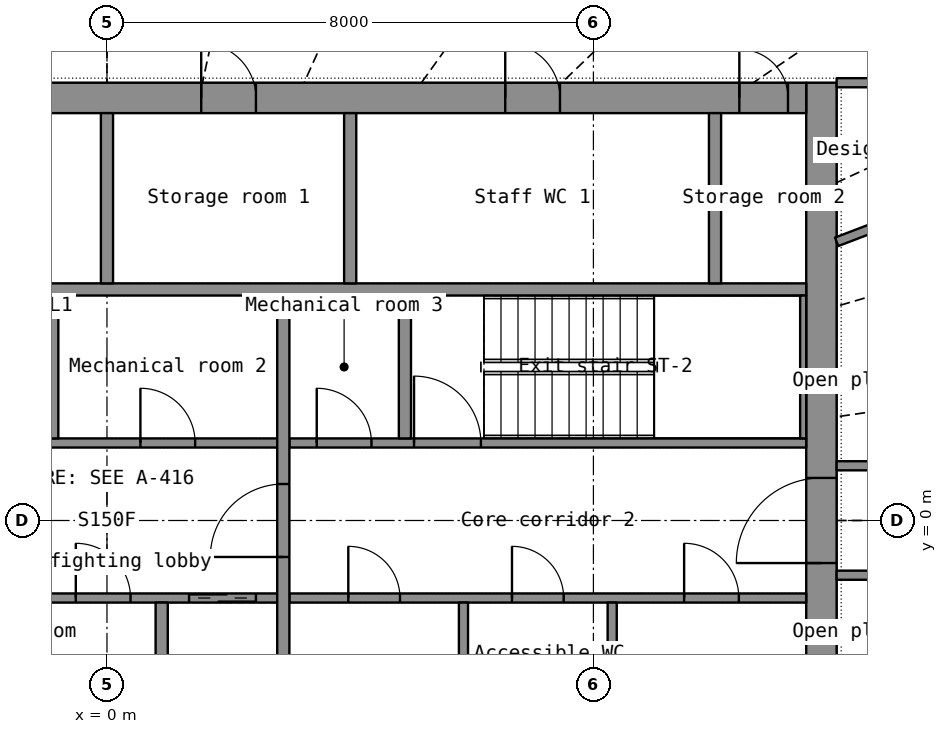
"""IFC4 building model, lengths in metres.
Left out: names, types, materials, properties, quantities, classifications, styles, units other than length and angle.
Written with IfcOpenShell. Run it as: python <this file> out.ifc"""

import sys

from ifc_helpers import new_model, si_unit, direction, frame, frame_2d, origin, place, context, subcontext, project, spatial, rectangle, extrude, element, fill, save


model = new_model("IFC4")
c1 = context("Model", 3, precision=1e-05, world=origin(), true_north=direction((0.0, 1.0)))
c2 = subcontext(c1, "Body", "Model", "MODEL_VIEW")
j1 = project(units=[si_unit("LENGTHUNIT", "METRE"), si_unit("PLANEANGLEUNIT", "RADIAN")], contexts=[c1])
p1 = place(None, origin())
s1 = spatial("IfcSite", under=j1, at=p1, CompositionType="ELEMENT")
p2 = place(p1, origin())
s2 = spatial("IfcBuilding", under=s1, at=p2, CompositionType="ELEMENT")
p3 = place(p2, frame((0.0, 0.0, 111.9)))
s3 = spatial("IfcBuildingStorey", under=s2, at=p3, CompositionType="ELEMENT", Elevation=111.9)
p4 = place(p3, frame((11.75, -7.2, 0.0), z_axis=(0.0, 0.0, 1.0), x_axis=(0.0, 1.0, 0.0)))
e1 = element("IfcWall", 1, at=p4, inside=s3, PredefinedType="SHEAR", context=c2, shape_type="SweptSolid", body=[
    extrude(rectangle(XDim=14.4, YDim=0.5, at=frame_2d((7.2, 0.0))), origin(), (0.0, 0.0, 1.0), 3.3),
])
p5 = place(p4, frame((6.5, 0.0, 0.0)))
e2 = element("IfcOpeningElement", 2, at=p5, cuts=e1, PredefinedType="OPENING", context=c2, shape_type="SweptSolid", body=[
    extrude(rectangle(XDim=1.4, YDim=2.2, at=frame_2d((0.7, 1.1))), frame((0.0, 0.26, 0.0), z_axis=(0.0, -1.0, 0.0), x_axis=(1.0, 0.0, 0.0)), (0.0, 0.0, 1.0), 0.52),
])
p6 = place(p3, frame((-11.5, 6.95, 0.0), z_axis=(0.0, 0.0, 1.0), x_axis=(1.0, 0.0, 0.0)))
e3 = element("IfcWall", 3, at=p6, inside=s3, PredefinedType="SHEAR", context=c2, shape_type="SweptSolid", body=[
    extrude(rectangle(XDim=23.0, YDim=0.5, at=frame_2d((11.5, 0.0))), origin(), (0.0, 0.0, 1.0), 3.3),
])
p7 = place(p6, frame((1.95, 0.0, 0.0)))
e4 = element("IfcOpeningElement", 4, at=p7, cuts=e3, PredefinedType="OPENING", context=c2, shape_type="SweptSolid", body=[
    extrude(rectangle(XDim=1.1, YDim=2.2, at=frame_2d((0.55, 1.1))), frame((0.0, 0.26, 0.0), z_axis=(0.0, -1.0, 0.0), x_axis=(1.0, 0.0, 0.0)), (0.0, 0.0, 1.0), 0.52),
])
p8 = place(p6, frame((8.05, 0.0, 0.0)))
e5 = element("IfcOpeningElement", 5, at=p8, cuts=e3, PredefinedType="OPENING", context=c2, shape_type="SweptSolid", body=[
    extrude(rectangle(XDim=0.9, YDim=2.1, at=frame_2d((0.45, 1.05))), frame((0.0, 0.26, 0.0), z_axis=(0.0, -1.0, 0.0), x_axis=(1.0, 0.0, 0.0)), (0.0, 0.0, 1.0), 0.52),
])
p9 = place(p6, frame((13.05, 0.0, 0.0)))
e6 = element("IfcOpeningElement", 6, at=p9, cuts=e3, PredefinedType="OPENING", context=c2, shape_type="SweptSolid", body=[
    extrude(rectangle(XDim=0.9, YDim=2.1, at=frame_2d((0.45, 1.05))), frame((0.0, 0.26, 0.0), z_axis=(0.0, -1.0, 0.0), x_axis=(1.0, 0.0, 0.0)), (0.0, 0.0, 1.0), 0.52),
])
p10 = place(p6, frame((18.05, 0.0, 0.0)))
e7 = element("IfcOpeningElement", 7, at=p10, cuts=e3, PredefinedType="OPENING", context=c2, shape_type="SweptSolid", body=[
    extrude(rectangle(XDim=0.9, YDim=2.1, at=frame_2d((0.45, 1.05))), frame((0.0, 0.26, 0.0), z_axis=(0.0, -1.0, 0.0), x_axis=(1.0, 0.0, 0.0)), (0.0, 0.0, 1.0), 0.52),
])
p11 = place(p6, frame((0.3, 0.0, 0.0)))
e8 = element("IfcOpeningElement", 8, at=p11, cuts=e3, PredefinedType="OPENING", context=c2, shape_type="SweptSolid", body=[
    extrude(rectangle(XDim=0.8, YDim=2.05, at=frame_2d((0.4, 1.025))), frame((0.0, 0.26, 0.0), z_axis=(0.0, -1.0, 0.0), x_axis=(1.0, 0.0, 0.0)), (0.0, 0.0, 1.0), 0.52),
])
p12 = place(p6, frame((21.9, 0.0, 0.0)))
e9 = element("IfcOpeningElement", 9, at=p12, cuts=e3, PredefinedType="OPENING", context=c2, shape_type="SweptSolid", body=[
    extrude(rectangle(XDim=0.8, YDim=2.05, at=frame_2d((0.4, 1.025))), frame((0.0, 0.26, 0.0), z_axis=(0.0, -1.0, 0.0), x_axis=(1.0, 0.0, 0.0)), (0.0, 0.0, 1.0), 0.52),
])
p13 = place(p3, frame((-11.5, 3.8, 0.0), z_axis=(0.0, 0.0, 1.0), x_axis=(1.0, 0.0, 0.0)))
e10 = element("IfcWall", 10, at=p13, inside=s3, PredefinedType="SHEAR", context=c2, shape_type="SweptSolid", body=[
    extrude(rectangle(XDim=23.0, YDim=0.2, at=frame_2d((11.5, 0.0))), origin(), (0.0, 0.0, 1.0), 3.3),
])
p14 = place(p3, frame((10.0, 3.9, 0.0), z_axis=(0.0, 0.0, 1.0), x_axis=(0.0, 1.0, 0.0)))
e11 = element("IfcWall", 11, at=p14, inside=s3, PredefinedType="SHEAR", context=c2, shape_type="SweptSolid", body=[
    extrude(rectangle(XDim=2.8, YDim=0.2, at=frame_2d((1.4, 0.0))), origin(), (0.0, 0.0, 1.0), 3.3),
])
for number, where, z_axis, x_axis in (
    (12, (0.0, 3.9, 0.0), (0.0, 0.0, 1.0), (0.0, 1.0, 0.0)),
    (13, (4.0, 3.9, 0.0), (0.0, 0.0, 1.0), (0.0, 1.0, 0.0)),
):
    element("IfcWall", number, at=place(p3, frame(where, z_axis=z_axis, x_axis=x_axis)), inside=s3, PredefinedType="PARTITIONING", context=c2, shape_type="SweptSolid", body=[
        extrude(rectangle(XDim=2.8, YDim=0.2, at=frame_2d((1.4, 0.0))), origin(), (0.0, 0.0, 1.0), 3.3),
    ])
p15 = place(p3, frame((-2.8, -1.275, 0.0), z_axis=(0.0, 0.0, 1.0), x_axis=(1.0, 0.0, 0.0)))
e14 = element("IfcWall", 14, at=p15, inside=s3, PredefinedType="SHEAR", context=c2, shape_type="SweptSolid", body=[
    extrude(rectangle(XDim=5.6, YDim=0.15, at=frame_2d((2.8, 0.0))), origin(), (0.0, 0.0, 1.0), 3.3),
])
p16 = place(p15, frame((4.15, 0.0, 0.0)))
e15 = element("IfcOpeningElement", 15, at=p16, cuts=e14, PredefinedType="OPENING", context=c2, shape_type="SweptSolid", body=[
    extrude(rectangle(XDim=1.1, YDim=2.2, at=frame_2d((0.55, 1.1))), frame((0.0, 0.085, 0.0), z_axis=(0.0, -1.0, 0.0), x_axis=(1.0, 0.0, 0.0)), (0.0, 0.0, 1.0), 0.17),
])
p17 = place(p15, frame((0.413, 0.0, 0.0)))
e16 = element("IfcOpeningElement", 16, at=p17, cuts=e14, PredefinedType="OPENING", context=c2, shape_type="SweptSolid", body=[
    extrude(rectangle(XDim=0.9, YDim=2.1, at=frame_2d((0.45, 1.05))), frame((0.0, 0.085, 0.0), z_axis=(0.0, -1.0, 0.0), x_axis=(1.0, 0.0, 0.0)), (0.0, 0.0, 1.0), 0.17),
])
p18 = place(p15, frame((2.288, 0.0, 0.0)))
e17 = element("IfcOpeningElement", 17, at=p18, cuts=e14, PredefinedType="OPENING", context=c2, shape_type="SweptSolid", body=[
    extrude(rectangle(XDim=0.9, YDim=2.1, at=frame_2d((0.45, 1.05))), frame((0.0, 0.085, 0.0), z_axis=(0.0, -1.0, 0.0), x_axis=(1.0, 0.0, 0.0)), (0.0, 0.0, 1.0), 0.17),
])
p19 = place(p3, frame((3.0, -1.275, 0.0), z_axis=(0.0, 0.0, 1.0), x_axis=(1.0, 0.0, 0.0)))
e18 = element("IfcWall", 18, at=p19, inside=s3, PredefinedType="PARTITIONING", context=c2, shape_type="SweptSolid", body=[
    extrude(rectangle(XDim=8.5, YDim=0.15, at=frame_2d((4.25, 0.0))), origin(), (0.0, 0.0, 1.0), 3.3),
])
p20 = place(p19, frame((0.969, 0.0, 0.0)))
e19 = element("IfcOpeningElement", 19, at=p20, cuts=e18, PredefinedType="OPENING", context=c2, shape_type="SweptSolid", body=[
    extrude(rectangle(XDim=0.85, YDim=2.1, at=frame_2d((0.425, 1.05))), frame((0.0, 0.085, 0.0), z_axis=(0.0, -1.0, 0.0), x_axis=(1.0, 0.0, 0.0)), (0.0, 0.0, 1.0), 0.17),
])
p21 = place(p19, frame((3.661, 0.0, 0.0)))
e20 = element("IfcOpeningElement", 20, at=p21, cuts=e18, PredefinedType="OPENING", context=c2, shape_type="SweptSolid", body=[
    extrude(rectangle(XDim=0.85, YDim=2.1, at=frame_2d((0.425, 1.05))), frame((0.0, 0.085, 0.0), z_axis=(0.0, -1.0, 0.0), x_axis=(1.0, 0.0, 0.0)), (0.0, 0.0, 1.0), 0.17),
])
p22 = place(p19, frame((6.492, 0.0, 0.0)))
e21 = element("IfcOpeningElement", 21, at=p22, cuts=e18, PredefinedType="OPENING", context=c2, shape_type="SweptSolid", body=[
    extrude(rectangle(XDim=0.9, YDim=2.1, at=frame_2d((0.45, 1.05))), frame((0.0, 0.085, 0.0), z_axis=(0.0, -1.0, 0.0), x_axis=(1.0, 0.0, 0.0)), (0.0, 0.0, 1.0), 0.17),
])
p23 = place(p3, frame((-2.8, 1.275, 0.0), z_axis=(0.0, 0.0, 1.0), x_axis=(1.0, 0.0, 0.0)))
e22 = element("IfcWall", 22, at=p23, inside=s3, PredefinedType="SHEAR", context=c2, shape_type="SweptSolid", body=[
    extrude(rectangle(XDim=5.6, YDim=0.15, at=frame_2d((2.8, 0.0))), origin(), (0.0, 0.0, 1.0), 3.3),
])
p24 = place(p23, frame((0.35, 0.0, 0.0)))
e23 = element("IfcOpeningElement", 23, at=p24, cuts=e22, PredefinedType="OPENING", context=c2, shape_type="SweptSolid", body=[
    extrude(rectangle(XDim=1.1, YDim=2.2, at=frame_2d((0.55, 1.1))), frame((0.0, 0.085, 0.0), z_axis=(0.0, -1.0, 0.0), x_axis=(1.0, 0.0, 0.0)), (0.0, 0.0, 1.0), 0.17),
])
p25 = place(p23, frame((3.35, 0.0, 0.0)))
e24 = element("IfcOpeningElement", 24, at=p25, cuts=e22, PredefinedType="OPENING", context=c2, shape_type="SweptSolid", body=[
    extrude(rectangle(XDim=0.9, YDim=2.1, at=frame_2d((0.45, 1.05))), frame((0.0, 0.085, 0.0), z_axis=(0.0, -1.0, 0.0), x_axis=(1.0, 0.0, 0.0)), (0.0, 0.0, 1.0), 0.17),
])
p26 = place(p3, frame((3.0, 1.275, 0.0), z_axis=(0.0, 0.0, 1.0), x_axis=(1.0, 0.0, 0.0)))
e25 = element("IfcWall", 25, at=p26, inside=s3, PredefinedType="SHEAR", context=c2, shape_type="SweptSolid", body=[
    extrude(rectangle(XDim=8.5, YDim=0.15, at=frame_2d((4.25, 0.0))), origin(), (0.0, 0.0, 1.0), 3.3),
])
p27 = place(p26, frame((2.05, 0.0, 0.0)))
e26 = element("IfcOpeningElement", 26, at=p27, cuts=e25, PredefinedType="OPENING", context=c2, shape_type="SweptSolid", body=[
    extrude(rectangle(XDim=1.1, YDim=2.15, at=frame_2d((0.55, 1.075))), frame((0.0, 0.085, 0.0), z_axis=(0.0, -1.0, 0.0), x_axis=(1.0, 0.0, 0.0)), (0.0, 0.0, 1.0), 0.17),
])
p28 = place(p26, frame((0.45, 0.0, 0.0)))
e27 = element("IfcOpeningElement", 27, at=p28, cuts=e25, PredefinedType="OPENING", context=c2, shape_type="SweptSolid", body=[
    extrude(rectangle(XDim=0.9, YDim=2.1, at=frame_2d((0.45, 1.05))), frame((0.0, 0.085, 0.0), z_axis=(0.0, -1.0, 0.0), x_axis=(1.0, 0.0, 0.0)), (0.0, 0.0, 1.0), 0.17),
])
p29 = place(p3, frame((2.9, -3.7, 0.0), z_axis=(0.0, 0.0, 1.0), x_axis=(0.0, 1.0, 0.0)))
e28 = element("IfcWall", 28, at=p29, inside=s3, PredefinedType="SHEAR", context=c2, shape_type="SweptSolid", body=[
    extrude(rectangle(XDim=7.4, YDim=0.2, at=frame_2d((3.7, 0.0))), origin(), (0.0, 0.0, 1.0), 3.3),
])
p30 = place(p29, frame((3.1, 0.0, 0.0)))
e29 = element("IfcOpeningElement", 29, at=p30, cuts=e28, PredefinedType="OPENING", context=c2, shape_type="SweptSolid", body=[
    extrude(rectangle(XDim=1.2, YDim=2.2, at=frame_2d((0.6, 1.1))), frame((0.0, 0.11, 0.0), z_axis=(0.0, -1.0, 0.0), x_axis=(1.0, 0.0, 0.0)), (0.0, 0.0, 1.0), 0.22),
])
for number, where, z_axis, x_axis in (
    (30, (-0.9, 1.35, 0.0), (0.0, 0.0, 1.0), (0.0, 1.0, 0.0)),
    (31, (0.9, -3.7, 0.0), (0.0, 0.0, 1.0), (0.0, 1.0, 0.0)),
):
    element("IfcWall", number, at=place(p3, frame(where, z_axis=z_axis, x_axis=x_axis)), inside=s3, PredefinedType="SHEAR", context=c2, shape_type="SweptSolid", body=[
        extrude(rectangle(XDim=2.35, YDim=0.2, at=frame_2d((1.175, 0.0))), origin(), (0.0, 0.0, 1.0), 3.3),
    ])
p31 = place(p3, frame((11.45, 1.35, 0.0), z_axis=(0.0, 0.0, 1.0), x_axis=(0.0, 1.0, 0.0)))
e32 = element("IfcWall", 32, at=p31, inside=s3, PredefinedType="SHEAR", context=c2, shape_type="SweptSolid", body=[
    extrude(rectangle(XDim=2.35, YDim=0.1, at=frame_2d((1.175, 0.0))), origin(), (0.0, 0.0, 1.0), 3.3),
])
p32 = place(p3, frame((4.9, 1.35, 0.0), z_axis=(0.0, 0.0, 1.0), x_axis=(0.0, 1.0, 0.0)))
e33 = element("IfcWall", 33, at=p32, inside=s3, PredefinedType="SHEAR", context=c2, shape_type="SweptSolid", body=[
    extrude(rectangle(XDim=2.35, YDim=0.2, at=frame_2d((1.175, 0.0))), origin(), (0.0, 0.0, 1.0), 3.3),
])
for number, where, z_axis, x_axis in (
    (34, (5.863, -3.7, 0.0), (0.0, 0.0, 1.0), (0.0, 1.0, 0.0)),
    (35, (8.309, -3.7, 0.0), (0.0, 0.0, 1.0), (0.0, 1.0, 0.0)),
):
    element("IfcWall", number, at=place(p3, frame(where, z_axis=z_axis, x_axis=x_axis)), inside=s3, PredefinedType="PARTITIONING", context=c2, shape_type="SweptSolid", body=[
        extrude(rectangle(XDim=2.35, YDim=0.15, at=frame_2d((1.175, 0.0))), origin(), (0.0, 0.0, 1.0), 3.3),
    ])
p33 = place(p3, frame((15.896, 6.072, 0.0), z_axis=(0.0, 0.0, 1.0), x_axis=(-0.934175823, -0.356813021, 0.0)))
e36 = element("IfcWall", 36, at=p33, inside=s3, PredefinedType="PARTITIONING", context=c2, shape_type="SweptSolid", body=[
    extrude(rectangle(XDim=4.171, YDim=0.15, at=frame_2d((2.085, 0.0))), origin(), (0.0, 0.0, 1.0), 2.4),
])
p34 = place(p3, frame((12.0, -0.9, 0.0), z_axis=(0.0, 0.0, 1.0), x_axis=(1.0, 0.0, 0.0)))
e37 = element("IfcWall", 37, at=p34, inside=s3, PredefinedType="PARTITIONING", context=c2, shape_type="SweptSolid", body=[
    extrude(rectangle(XDim=3.923, YDim=0.15, at=frame_2d((1.961, 0.0))), origin(), (0.0, 0.0, 1.0), 2.4),
])
p35 = place(p3, frame((12.0, 7.2, 0.0), z_axis=(0.0, 0.0, 1.0), x_axis=(1.0, 0.0, 0.0)))
e38 = element("IfcWall", 38, at=p35, inside=s3, PredefinedType="PARTITIONING", context=c2, shape_type="SweptSolid", body=[
    extrude(rectangle(XDim=4.0, YDim=0.15, at=frame_2d((2.0, 0.0))), origin(), (0.0, 0.0, 1.0), 2.4),
])
p36 = place(p35, frame((1.525, 0.0, 0.0)))
e39 = element("IfcOpeningElement", 39, at=p36, cuts=e38, PredefinedType="OPENING", context=c2, shape_type="SweptSolid", body=[
    extrude(rectangle(XDim=0.95, YDim=2.15, at=frame_2d((0.475, 1.075))), frame((0.0, 0.085, 0.0), z_axis=(0.0, -1.0, 0.0), x_axis=(1.0, 0.0, 0.0)), (0.0, 0.0, 1.0), 0.17),
])
p37 = place(p3, frame((15.923, 0.9, 0.0), z_axis=(0.0, 0.0, 1.0), x_axis=(-1.0, 0.0, 0.0)))
e40 = element("IfcWall", 40, at=p37, inside=s3, PredefinedType="PARTITIONING", context=c2, shape_type="SweptSolid", body=[
    extrude(rectangle(XDim=3.923, YDim=0.15, at=frame_2d((1.961, 0.0))), origin(), (0.0, 0.0, 1.0), 2.4),
])
p38 = place(p9, origin())
e41 = element("IfcDoor", 41, at=p38, inside=s3, OperationType="SINGLE_SWING_LEFT", PredefinedType="DOOR", context=c2, shape_type="SweptSolid", body=[
    extrude(rectangle(XDim=0.9, YDim=2.1, at=frame_2d((0.45, 1.05))), frame((0.0, 0.025, 0.0), z_axis=(0.0, -1.0, 0.0), x_axis=(1.0, 0.0, 0.0)), (0.0, 0.0, 1.0), 0.05),
])
fill(e6, e41)
p39 = place(p10, origin())
e42 = element("IfcDoor", 42, at=p39, inside=s3, OperationType="SINGLE_SWING_LEFT", PredefinedType="DOOR", context=c2, shape_type="SweptSolid", body=[
    extrude(rectangle(XDim=0.9, YDim=2.1, at=frame_2d((0.45, 1.05))), frame((0.0, 0.025, 0.0), z_axis=(0.0, -1.0, 0.0), x_axis=(1.0, 0.0, 0.0)), (0.0, 0.0, 1.0), 0.05),
])
fill(e7, e42)
p40 = place(p12, origin())
e43 = element("IfcDoor", 43, at=p40, inside=s3, OperationType="SINGLE_SWING_LEFT", PredefinedType="DOOR", context=c2, shape_type="SweptSolid", body=[
    extrude(rectangle(XDim=0.8, YDim=2.05, at=frame_2d((0.4, 1.025))), frame((0.0, 0.025, 0.0), z_axis=(0.0, -1.0, 0.0), x_axis=(1.0, 0.0, 0.0)), (0.0, 0.0, 1.0), 0.05),
])
fill(e9, e43)
p41 = place(p5, origin())
e44 = element("IfcDoor", 44, at=p41, inside=s3, OperationType="DOUBLE_DOOR_SINGLE_SWING", PredefinedType="DOOR", context=c2, shape_type="SweptSolid", body=[
    extrude(rectangle(XDim=1.4, YDim=2.2, at=frame_2d((0.7, 1.1))), frame((0.0, 0.025, 0.0), z_axis=(0.0, -1.0, 0.0), x_axis=(1.0, 0.0, 0.0)), (0.0, 0.0, 1.0), 0.05),
])
fill(e2, e44)
p42 = place(p30, origin())
e45 = element("IfcDoor", 45, at=p42, inside=s3, OperationType="SINGLE_SWING_LEFT", PredefinedType="DOOR", context=c2, shape_type="SweptSolid", body=[
    extrude(rectangle(XDim=1.2, YDim=2.2, at=frame_2d((0.6, 1.1))), frame((0.0, 0.025, 0.0), z_axis=(0.0, -1.0, 0.0), x_axis=(1.0, 0.0, 0.0)), (0.0, 0.0, 1.0), 0.05),
])
fill(e29, e45)
p43 = place(p16, origin())
e46 = element("IfcDoor", 46, at=p43, inside=s3, OperationType="DOUBLE_DOOR_SLIDING", PredefinedType="DOOR", context=c2, shape_type="SweptSolid", body=[
    extrude(rectangle(XDim=1.1, YDim=2.2, at=frame_2d((0.55, 1.1))), frame((0.0, 0.025, 0.0), z_axis=(0.0, -1.0, 0.0), x_axis=(1.0, 0.0, 0.0)), (0.0, 0.0, 1.0), 0.05),
])
fill(e15, e46)
p44 = place(p27, origin())
e47 = element("IfcDoor", 47, at=p44, inside=s3, OperationType="SINGLE_SWING_LEFT", PredefinedType="DOOR", context=c2, shape_type="SweptSolid", body=[
    extrude(rectangle(XDim=1.1, YDim=2.15, at=frame_2d((0.55, 1.075))), frame((0.0, 0.025, 0.0), z_axis=(0.0, -1.0, 0.0), x_axis=(1.0, 0.0, 0.0)), (0.0, 0.0, 1.0), 0.05),
])
fill(e26, e47)
p45 = place(p20, origin())
e48 = element("IfcDoor", 48, at=p45, inside=s3, OperationType="SINGLE_SWING_LEFT", PredefinedType="DOOR", context=c2, shape_type="SweptSolid", body=[
    extrude(rectangle(XDim=0.85, YDim=2.1, at=frame_2d((0.425, 1.05))), frame((0.0, 0.025, 0.0), z_axis=(0.0, -1.0, 0.0), x_axis=(1.0, 0.0, 0.0)), (0.0, 0.0, 1.0), 0.05),
])
fill(e19, e48)
p46 = place(p21, origin())
e49 = element("IfcDoor", 49, at=p46, inside=s3, OperationType="SINGLE_SWING_LEFT", PredefinedType="DOOR", context=c2, shape_type="SweptSolid", body=[
    extrude(rectangle(XDim=0.85, YDim=2.1, at=frame_2d((0.425, 1.05))), frame((0.0, 0.025, 0.0), z_axis=(0.0, -1.0, 0.0), x_axis=(1.0, 0.0, 0.0)), (0.0, 0.0, 1.0), 0.05),
])
fill(e20, e49)
p47 = place(p22, origin())
e50 = element("IfcDoor", 50, at=p47, inside=s3, OperationType="SINGLE_SWING_LEFT", PredefinedType="DOOR", context=c2, shape_type="SweptSolid", body=[
    extrude(rectangle(XDim=0.9, YDim=2.1, at=frame_2d((0.45, 1.05))), frame((0.0, 0.025, 0.0), z_axis=(0.0, -1.0, 0.0), x_axis=(1.0, 0.0, 0.0)), (0.0, 0.0, 1.0), 0.05),
])
fill(e21, e50)
p48 = place(p25, origin())
e51 = element("IfcDoor", 51, at=p48, inside=s3, OperationType="SINGLE_SWING_LEFT", PredefinedType="DOOR", context=c2, shape_type="SweptSolid", body=[
    extrude(rectangle(XDim=0.9, YDim=2.1, at=frame_2d((0.45, 1.05))), frame((0.0, 0.025, 0.0), z_axis=(0.0, -1.0, 0.0), x_axis=(1.0, 0.0, 0.0)), (0.0, 0.0, 1.0), 0.05),
])
fill(e24, e51)
p49 = place(p18, origin())
e52 = element("IfcDoor", 52, at=p49, inside=s3, OperationType="SINGLE_SWING_LEFT", PredefinedType="DOOR", context=c2, shape_type="SweptSolid", body=[
    extrude(rectangle(XDim=0.9, YDim=2.1, at=frame_2d((0.45, 1.05))), frame((0.0, 0.025, 0.0), z_axis=(0.0, -1.0, 0.0), x_axis=(1.0, 0.0, 0.0)), (0.0, 0.0, 1.0), 0.05),
])
fill(e17, e52)
p50 = place(p28, origin())
e53 = element("IfcDoor", 53, at=p50, inside=s3, OperationType="SINGLE_SWING_LEFT", PredefinedType="DOOR", context=c2, shape_type="SweptSolid", body=[
    extrude(rectangle(XDim=0.9, YDim=2.1, at=frame_2d((0.45, 1.05))), frame((0.0, 0.025, 0.0), z_axis=(0.0, -1.0, 0.0), x_axis=(1.0, 0.0, 0.0)), (0.0, 0.0, 1.0), 0.05),
])
fill(e27, e53)
save(model, sys.argv[1])
